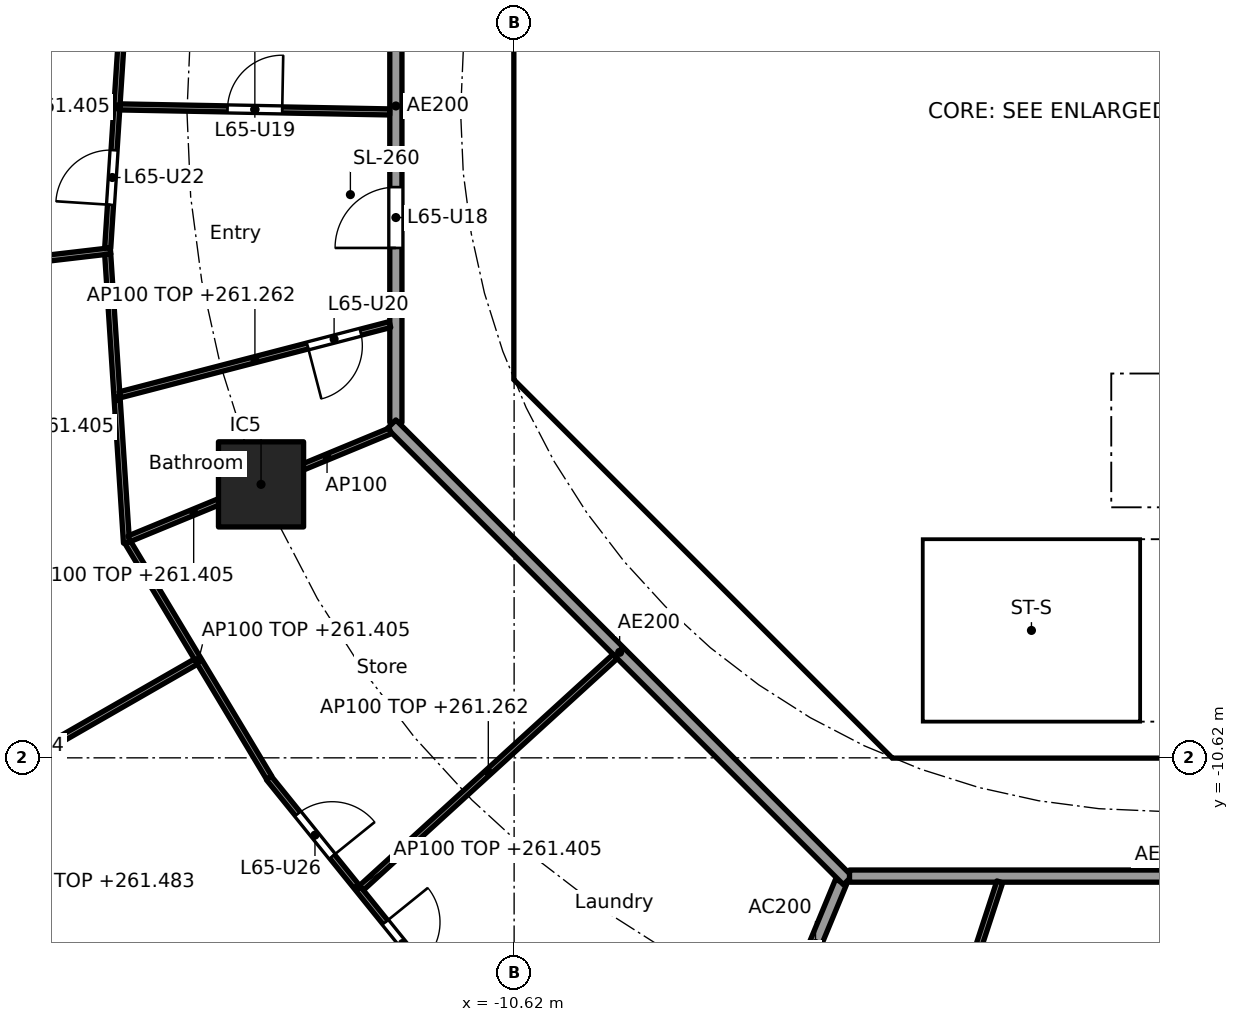
"""IFC4 building model, lengths in metres.
Left out: names, types, materials, properties, quantities, classifications, styles, units other than length and angle.
Written with IfcOpenShell. Run it as: python <this file> out.ifc"""

import sys

from ifc_helpers import new_model, si_unit, direction, frame, frame_2d, origin, origin_2d, place, context, subcontext, project, spatial, polyline, rectangle, outline, extrude, element, fill, save


model = new_model("IFC4")
c1 = context("Model", 3, precision=1e-05, world=origin(), true_north=direction((0.0, 1.0)))
c2 = subcontext(c1, "Body", "Model", "MODEL_VIEW")
j1 = project(units=[si_unit("LENGTHUNIT", "METRE"), si_unit("PLANEANGLEUNIT", "RADIAN")], contexts=[c1])
p1 = place(None, origin())
s1 = spatial("IfcSite", under=j1, at=p1, CompositionType="ELEMENT")
p2 = place(p1, origin())
s2 = spatial("IfcBuilding", under=s1, at=p2, CompositionType="ELEMENT")
p3 = place(p2, frame((0.0, 0.0, 258.5)))
s3 = spatial("IfcBuildingStorey", under=s2, at=p3, CompositionType="ELEMENT", Elevation=258.5)
p4 = place(p3, frame((-14.782, -6.123, 0.0), z_axis=(0.0, 0.0, 1.0), x_axis=(1.0, 0.0, 0.0)))
e1 = element("IfcColumn", 1, at=p4, inside=s3, PredefinedType="COLUMN", context=c2, shape_type="SweptSolid", body=[
    extrude(rectangle(XDim=1.4, YDim=1.4, at=origin_2d()), origin(), (0.0, 0.0, 1.0), 3.7),
])
p5 = place(p3, frame((-10.325, 3.801, 0.0), z_axis=(0.0, 0.0, 1.0), x_axis=(0.0, -1.0, 0.0)))
e2 = element("IfcWall", 2, at=p5, inside=s3, PredefinedType="SHEAR", context=c2, shape_type="SweptSolid", body=[
    extrude(rectangle(XDim=7.602, YDim=0.6, at=frame_2d((3.801, 0.0))), origin(), (0.0, 0.0, 1.0), 3.44),
])
p6 = place(p5, frame((0.651, 0.0, 0.0)))
e3 = element("IfcOpeningElement", 3, at=p6, cuts=e2, PredefinedType="OPENING", context=c2, shape_type="SweptSolid", body=[
    extrude(rectangle(XDim=1.5, YDim=2.1, at=frame_2d((0.75, 1.05))), frame((0.0, 0.31, 0.0), z_axis=(0.0, -1.0, 0.0), x_axis=(1.0, 0.0, 0.0)), (0.0, 0.0, 1.0), 0.62),
])
p7 = place(p5, frame((5.451, 0.0, 0.0)))
e4 = element("IfcOpeningElement", 4, at=p7, cuts=e2, PredefinedType="OPENING", context=c2, shape_type="SweptSolid", body=[
    extrude(rectangle(XDim=1.5, YDim=2.1, at=frame_2d((0.75, 1.05))), frame((0.0, 0.31, 0.0), z_axis=(0.0, -1.0, 0.0), x_axis=(1.0, 0.0, 0.0)), (0.0, 0.0, 1.0), 0.62),
])
p8 = place(p3, frame((-9.988, -4.613, 0.0), z_axis=(0.0, 0.0, 1.0), x_axis=(0.707106781187, -0.707106781187, 0.0)))
e5 = element("IfcWall", 5, at=p8, inside=s3, PredefinedType="SHEAR", context=c2, shape_type="SweptSolid", body=[
    extrude(rectangle(XDim=7.602, YDim=0.6, at=frame_2d((3.801, 0.0))), origin(), (0.0, 0.0, 1.0), 3.44),
])
p9 = place(p8, frame((6.151, 0.0, 0.0)))
e6 = element("IfcOpeningElement", 6, at=p9, cuts=e5, PredefinedType="OPENING", context=c2, shape_type="SweptSolid", body=[
    extrude(rectangle(XDim=1.1, YDim=2.1, at=frame_2d((0.55, 1.05))), frame((0.0, 0.31, 0.0), z_axis=(0.0, -1.0, 0.0), x_axis=(1.0, 0.0, 0.0)), (0.0, 0.0, 1.0), 0.62),
])
p10 = place(p3, frame((-6.6, -7.427, 0.0), z_axis=(0.0, 0.0, 1.0), x_axis=(0.0, 1.0, 0.0)))
e7 = element("IfcWall", 7, at=p10, inside=s3, PredefinedType="PARTITIONING", context=c2, shape_type="SweptSolid", body=[
    extrude(rectangle(XDim=3.127, YDim=0.15, at=frame_2d((1.563, 0.0))), origin(), (0.0, 0.0, 1.0), 3.44),
])
p11 = place(p10, frame((1.076, 0.0, 0.0)))
e8 = element("IfcOpeningElement", 8, at=p11, cuts=e7, PredefinedType="OPENING", context=c2, shape_type="SweptSolid", body=[
    extrude(rectangle(XDim=0.9, YDim=2.1, at=frame_2d((0.45, 1.05))), frame((0.0, 0.085, 0.0), z_axis=(0.0, -1.0, 0.0), x_axis=(1.0, 0.0, 0.0)), (0.0, 0.0, 1.0), 0.17),
])
p12 = place(p3, frame((-4.0, -6.5, 0.0), z_axis=(0.0, 0.0, 1.0), x_axis=(0.0, 1.0, 0.0)))
e9 = element("IfcWall", 9, at=p12, inside=s3, PredefinedType="SOLIDWALL", context=c2, shape_type="SweptSolid", body=[
    extrude(rectangle(XDim=2.2, YDim=0.2, at=frame_2d((1.1, 0.0))), origin(), (0.0, 0.0, 1.0), 3.44),
])
p13 = place(p12, frame((0.65, 0.0, 0.0)))
e10 = element("IfcOpeningElement", 10, at=p13, cuts=e9, PredefinedType="OPENING", context=c2, shape_type="SweptSolid", body=[
    extrude(rectangle(XDim=0.9, YDim=2.1, at=frame_2d((0.45, 1.05))), frame((0.0, 0.11, 0.0), z_axis=(0.0, -1.0, 0.0), x_axis=(1.0, 0.0, 0.0)), (0.0, 0.0, 1.0), 0.22),
])
p14 = place(p3, frame((-6.7, -2.0, 0.0), z_axis=(0.0, 0.0, 1.0), x_axis=(1.0, 0.0, 0.0)))
e11 = element("IfcWall", 11, at=p14, inside=s3, PredefinedType="SOLIDWALL", context=c2, shape_type="SweptSolid", body=[
    extrude(rectangle(XDim=13.4, YDim=0.2, at=frame_2d((6.7, 0.0))), origin(), (0.0, 0.0, 1.0), 3.44),
])
p15 = place(p14, frame((9.45, 0.0, 0.0)))
e12 = element("IfcOpeningElement", 12, at=p15, cuts=e11, PredefinedType="OPENING", context=c2, shape_type="SweptSolid", body=[
    extrude(rectangle(XDim=1.1, YDim=2.1, at=frame_2d((0.55, 1.05))), frame((0.0, 0.11, 0.0), z_axis=(0.0, -1.0, 0.0), x_axis=(1.0, 0.0, 0.0)), (0.0, 0.0, 1.0), 0.22),
])
p16 = place(p14, frame((11.65, 0.0, 0.0)))
e13 = element("IfcOpeningElement", 13, at=p16, cuts=e11, PredefinedType="OPENING", context=c2, shape_type="SweptSolid", body=[
    extrude(rectangle(XDim=1.1, YDim=2.1, at=frame_2d((0.55, 1.05))), frame((0.0, 0.11, 0.0), z_axis=(0.0, -1.0, 0.0), x_axis=(1.0, 0.0, 0.0)), (0.0, 0.0, 1.0), 0.22),
])
p17 = place(p14, frame((1.85, 0.0, 0.0)))
e14 = element("IfcOpeningElement", 14, at=p17, cuts=e11, PredefinedType="OPENING", context=c2, shape_type="SweptSolid", body=[
    extrude(rectangle(XDim=0.9, YDim=2.1, at=frame_2d((0.45, 1.05))), frame((0.0, 0.11, 0.0), z_axis=(0.0, -1.0, 0.0), x_axis=(1.0, 0.0, 0.0)), (0.0, 0.0, 1.0), 0.22),
])
p18 = place(p14, frame((6.25, 0.0, 0.0)))
e15 = element("IfcOpeningElement", 15, at=p18, cuts=e11, PredefinedType="OPENING", context=c2, shape_type="SweptSolid", body=[
    extrude(rectangle(XDim=0.9, YDim=2.1, at=frame_2d((0.45, 1.05))), frame((0.0, 0.11, 0.0), z_axis=(0.0, -1.0, 0.0), x_axis=(1.0, 0.0, 0.0)), (0.0, 0.0, 1.0), 0.22),
])
p19 = place(p3, origin())
e16 = element("IfcWall", 16, at=p19, inside=s3, PredefinedType="SHEAR", context=c2, shape_type="SweptSolid", body=[
    extrude(outline(polyline([(-10.625, -3.801), (-10.025, -3.801), (-10.025, -4.152), (-9.776, -4.401), (-10.2, -4.825), (-10.625, -4.401), (-10.625, -3.801)])), origin(), (0.0, 0.0, 1.0), 3.44),
])
p20 = place(p3, origin())
e17 = element("IfcWall", 17, at=p20, inside=s3, PredefinedType="SHEAR", context=c2, shape_type="SweptSolid", body=[
    extrude(outline(polyline([(-4.152, -10.025), (4.152, -10.025), (4.401, -9.776), (4.825, -10.2), (4.401, -10.625), (-4.401, -10.625), (-4.825, -10.2), (-4.401, -9.776), (-4.152, -10.025)])), origin(), (0.0, 0.0, 1.0), 3.44),
])
p21 = place(p3, frame((-0.9, -6.5, 0.0), z_axis=(0.0, 0.0, 1.0), x_axis=(0.0, 1.0, 0.0)))
e18 = element("IfcWall", 18, at=p21, inside=s3, PredefinedType="SOLIDWALL", context=c2, shape_type="SweptSolid", body=[
    extrude(rectangle(XDim=2.2, YDim=0.2, at=frame_2d((1.1, 0.0))), origin(), (0.0, 0.0, 1.0), 3.44),
])
p22 = place(p3, origin())
e19 = element("IfcWall", 19, at=p22, inside=s3, PredefinedType="SOLIDWALL", context=c2, shape_type="SweptSolid", body=[
    extrude(outline(polyline([(-6.7, -2.1), (-6.5, -2.1), (-6.5, -4.1), (-2.3, -4.1), (-2.3, -2.1), (-2.1, -2.1), (-2.1, -4.1), (2.1, -4.1), (2.1, -2.1), (2.3, -2.1), (2.3, -4.1), (4.3, -4.1), (4.3, -2.1), (4.5, -2.1), (4.5, -4.1), (6.5, -4.1), (6.5, -2.1), (6.7, -2.1), (6.7, -4.3), (-6.7, -4.3), (-6.7, -2.1)])), origin(), (0.0, 0.0, 1.0), 3.44),
])
p23 = place(p3, frame((-10.025, -4.0, 0.0), z_axis=(0.0, 0.0, 1.0), x_axis=(1.0, 0.0, 0.0)))
e20 = element("IfcWall", 20, at=p23, inside=s3, PredefinedType="PARTITIONING", context=c2, shape_type="SweptSolid", body=[
    extrude(rectangle(XDim=3.325, YDim=0.2, at=frame_2d((1.662, 0.0))), origin(), (0.0, 0.0, 1.0), 3.44),
])
p24 = place(p3, origin())
e21 = element("IfcWall", 21, at=p24, inside=s3, PredefinedType="SOLIDWALL", context=c2, shape_type="SweptSolid", body=[
    extrude(outline(polyline([(-3.9, -10.025), (-4.1, -10.025), (-4.1, -7.025), (-3.9, -7.025), (-3.9, -10.025)])), origin(), (0.0, 0.0, 1.0), 3.44),
])
p25 = place(p3, origin())
e22 = element("IfcWall", 22, at=p25, inside=s3, PredefinedType="SOLIDWALL", context=c2, shape_type="SweptSolid", body=[
    extrude(outline(polyline([(4.1, -7.025), (-4.1, -7.025), (-4.1, -6.5), (4.1, -6.5), (4.1, -7.025)])), origin(), (0.0, 0.0, 1.0), 3.44),
])
p26 = place(p3, frame((-5.243, -12.657, 0.0), z_axis=(0.0, 0.0, 1.0), x_axis=(-0.382770106157, -0.923843626288, 0.0)))
e23 = element("IfcWall", 23, at=p26, inside=s3, PredefinedType="PARTITIONING", context=c2, shape_type="SweptSolid", body=[
    extrude(rectangle(XDim=2.199, YDim=0.2, at=frame_2d((1.1, 0.0))), origin(), (0.0, 0.0, 1.0), 3.44),
])
p27 = place(p3, frame((-12.565, 5.304, 0.0), z_axis=(0.0, 0.0, 1.0), x_axis=(0.0, -1.0, 0.0)))
e24 = element("IfcWall", 24, at=p27, inside=s3, PredefinedType="PARTITIONING", context=c2, shape_type="SweptSolid", body=[
    extrude(rectangle(XDim=10.409, YDim=0.2, at=frame_2d((5.205, 0.0))), origin(), (0.0, 0.0, 1.0), 3.44),
])
p28 = place(p27, frame((6.539, 0.0, 0.0)))
e25 = element("IfcOpeningElement", 25, at=p28, cuts=e24, PredefinedType="OPENING", context=c2, shape_type="SweptSolid", body=[
    extrude(rectangle(XDim=1.0, YDim=2.1, at=frame_2d((0.5, 1.05))), frame((0.0, 0.11, 0.0), z_axis=(0.0, -1.0, 0.0), x_axis=(1.0, 0.0, 0.0)), (0.0, 0.0, 1.0), 0.22),
])
p29 = place(p3, frame((-12.635, -5.134, 0.0), z_axis=(0.0, 0.0, 1.0), x_axis=(0.707106781187, -0.707106781187, 0.0)))
e26 = element("IfcWall", 26, at=p29, inside=s3, PredefinedType="PARTITIONING", context=c2, shape_type="SweptSolid", body=[
    extrude(rectangle(XDim=10.609, YDim=0.2, at=frame_2d((5.305, 0.0))), origin(), (0.0, 0.0, 1.0), 3.44),
])
p30 = place(p3, frame((-5.104, -12.565, 0.0), z_axis=(0.0, 0.0, 1.0), x_axis=(1.0, 0.0, 0.0)))
e27 = element("IfcWall", 27, at=p30, inside=s3, PredefinedType="PARTITIONING", context=c2, shape_type="SweptSolid", body=[
    extrude(rectangle(XDim=10.409, YDim=0.2, at=frame_2d((5.205, 0.0))), origin(), (0.0, 0.0, 1.0), 3.44),
])
p31 = place(p3, frame((-17.002, 2.409, 0.0), z_axis=(0.0, 0.0, 1.0), x_axis=(-0.064855550758, -0.997894662545, 0.0)))
e28 = element("IfcWall", 28, at=p31, inside=s3, PredefinedType="PARTITIONING", context=c2, shape_type="SweptSolid", body=[
    extrude(rectangle(XDim=4.656, YDim=0.1, at=frame_2d((2.328, 0.0))), origin(), (0.0, 0.0, 1.0), 2.905),
])
p32 = place(p31, frame((3.042, 0.0, 0.0)))
e29 = element("IfcOpeningElement", 29, at=p32, cuts=e28, PredefinedType="OPENING", context=c2, shape_type="SweptSolid", body=[
    extrude(rectangle(XDim=0.9, YDim=2.1, at=frame_2d((0.45, 1.05))), frame((0.0, 0.06, 0.0), z_axis=(0.0, -1.0, 0.0), x_axis=(1.0, 0.0, 0.0)), (0.0, 0.0, 1.0), 0.12),
])
p33 = place(p3, frame((-12.665, 0.002, 0.0), z_axis=(0.0, 0.0, 1.0), x_axis=(-0.999827178165, 0.018590691287, 0.0)))
e30 = element("IfcWall", 30, at=p33, inside=s3, PredefinedType="PARTITIONING", context=c2, shape_type="SweptSolid", body=[
    extrude(rectangle(XDim=4.439, YDim=0.1, at=frame_2d((2.219, 0.0))), origin(), (0.0, 0.0, 1.0), 2.762),
])
p34 = place(p33, frame((1.769, 0.0, 0.0)))
e31 = element("IfcOpeningElement", 31, at=p34, cuts=e30, PredefinedType="OPENING", context=c2, shape_type="SweptSolid", body=[
    extrude(rectangle(XDim=0.9, YDim=2.1, at=frame_2d((0.45, 1.05))), frame((0.0, 0.06, 0.0), z_axis=(0.0, -1.0, 0.0), x_axis=(1.0, 0.0, 0.0)), (0.0, 0.0, 1.0), 0.12),
])
p35 = place(p3, frame((-17.257, -2.282, 0.0), z_axis=(0.0, 0.0, 1.0), x_axis=(-0.993266024162, -0.11585596767, 0.0)))
e32 = element("IfcWall", 32, at=p35, inside=s3, PredefinedType="PARTITIONING", context=c2, shape_type="SweptSolid", body=[
    extrude(rectangle(XDim=6.168, YDim=0.1, at=frame_2d((3.084, 0.0))), origin(), (0.0, 0.0, 1.0), 2.905),
])
p36 = place(p35, frame((2.659, 0.0, 0.0)))
e33 = element("IfcOpeningElement", 33, at=p36, cuts=e32, PredefinedType="OPENING", context=c2, shape_type="SweptSolid", body=[
    extrude(rectangle(XDim=0.9, YDim=2.1, at=frame_2d((0.45, 1.05))), frame((0.0, 0.06, 0.0), z_axis=(0.0, -1.0, 0.0), x_axis=(1.0, 0.0, 0.0)), (0.0, 0.0, 1.0), 0.12),
])
p37 = place(p3, frame((-17.304, -2.338, 0.0), z_axis=(0.0, 0.0, 1.0), x_axis=(0.065003615989, -0.997885028402, 0.0)))
e34 = element("IfcWall", 34, at=p37, inside=s3, PredefinedType="PARTITIONING", context=c2, shape_type="SweptSolid", body=[
    extrude(rectangle(XDim=4.759, YDim=0.1, at=frame_2d((2.379, 0.0))), origin(), (0.0, 0.0, 1.0), 2.905),
])
p38 = place(p3, frame((-12.662, -3.495, 0.0), z_axis=(0.0, 0.0, 1.0), x_axis=(-0.967834941053, -0.251586022817, 0.0)))
e35 = element("IfcWall", 35, at=p38, inside=s3, PredefinedType="PARTITIONING", context=c2, shape_type="SweptSolid", body=[
    extrude(rectangle(XDim=4.59, YDim=0.1, at=frame_2d((2.295, 0.0))), origin(), (0.0, 0.0, 1.0), 2.762),
])
p39 = place(p38, frame((0.5, 0.0, 0.0)))
e36 = element("IfcOpeningElement", 36, at=p39, cuts=e35, PredefinedType="OPENING", context=c2, shape_type="SweptSolid", body=[
    extrude(rectangle(XDim=0.9, YDim=2.1, at=frame_2d((0.45, 1.05))), frame((0.0, 0.06, 0.0), z_axis=(0.0, -1.0, 0.0), x_axis=(1.0, 0.0, 0.0)), (0.0, 0.0, 1.0), 0.12),
])
p40 = place(p3, frame((-12.657, -5.243, 0.0), z_axis=(0.0, 0.0, 1.0), x_axis=(-0.923864733477, -0.382719158442, 0.0)))
e37 = element("IfcWall", 37, at=p40, inside=s3, PredefinedType="PARTITIONING", context=c2, shape_type="SweptSolid", body=[
    extrude(rectangle(XDim=2.25, YDim=0.1, at=frame_2d((1.125, 0.0))), origin(), (0.0, 0.0, 1.0), 3.44),
])
p41 = place(p3, frame((-14.828, -6.142, 0.0), z_axis=(0.0, 0.0, 1.0), x_axis=(-0.924479819749, -0.381230983627, 0.0)))
e38 = element("IfcWall", 38, at=p41, inside=s3, PredefinedType="PARTITIONING", context=c2, shape_type="SweptSolid", body=[
    extrude(rectangle(XDim=2.296, YDim=0.1, at=frame_2d((1.148, 0.0))), origin(), (0.0, 0.0, 1.0), 2.905),
])
p42 = place(p3, frame((-16.972, -7.08, 0.0), z_axis=(0.0, 0.0, 1.0), x_axis=(0.514989049311, -0.857196756346, 0.0)))
e39 = element("IfcWall", 39, at=p42, inside=s3, PredefinedType="PARTITIONING", context=c2, shape_type="SweptSolid", body=[
    extrude(rectangle(XDim=4.512, YDim=0.1, at=frame_2d((2.256, 0.0))), origin(), (0.0, 0.0, 1.0), 2.905),
])
p43 = place(p3, frame((-15.854, -9.038, 0.0), z_axis=(0.0, 0.0, 1.0), x_axis=(-0.867229230904, -0.497909089157, 0.0)))
e40 = element("IfcWall", 40, at=p43, inside=s3, PredefinedType="PARTITIONING", context=c2, shape_type="SweptSolid", body=[
    extrude(rectangle(XDim=7.853, YDim=0.1, at=frame_2d((3.926, 0.0))), origin(), (0.0, 0.0, 1.0), 2.983),
])
p44 = place(p43, frame((3.476, 0.0, 0.0)))
e41 = element("IfcOpeningElement", 41, at=p44, cuts=e40, PredefinedType="OPENING", context=c2, shape_type="SweptSolid", body=[
    extrude(rectangle(XDim=0.9, YDim=2.1, at=frame_2d((0.45, 1.05))), frame((0.0, 0.06, 0.0), z_axis=(0.0, -1.0, 0.0), x_axis=(1.0, 0.0, 0.0)), (0.0, 0.0, 1.0), 0.12),
])
p45 = place(p3, frame((-14.654, -10.951, 0.0), z_axis=(0.0, 0.0, 1.0), x_axis=(0.62815308134, -0.778089780426, 0.0)))
e42 = element("IfcWall", 42, at=p45, inside=s3, PredefinedType="PARTITIONING", context=c2, shape_type="SweptSolid", body=[
    extrude(rectangle(XDim=4.633, YDim=0.1, at=frame_2d((2.316, 0.0))), origin(), (0.0, 0.0, 1.0), 2.905),
])
p46 = place(p45, frame((0.758, 0.0, 0.0)))
e43 = element("IfcOpeningElement", 43, at=p46, cuts=e42, PredefinedType="OPENING", context=c2, shape_type="SweptSolid", body=[
    extrude(rectangle(XDim=0.9, YDim=2.1, at=frame_2d((0.45, 1.05))), frame((0.0, 0.06, 0.0), z_axis=(0.0, -1.0, 0.0), x_axis=(1.0, 0.0, 0.0)), (0.0, 0.0, 1.0), 0.12),
])
p47 = place(p45, frame((3.049, 0.0, 0.0)))
e44 = element("IfcOpeningElement", 44, at=p47, cuts=e42, PredefinedType="OPENING", context=c2, shape_type="SweptSolid", body=[
    extrude(rectangle(XDim=0.9, YDim=2.1, at=frame_2d((0.45, 1.05))), frame((0.0, 0.06, 0.0), z_axis=(0.0, -1.0, 0.0), x_axis=(1.0, 0.0, 0.0)), (0.0, 0.0, 1.0), 0.12),
])
p48 = place(p3, frame((-8.958, -8.952, 0.0), z_axis=(0.0, 0.0, 1.0), x_axis=(-0.73876526954, -0.673962815385, 0.0)))
e45 = element("IfcWall", 45, at=p48, inside=s3, PredefinedType="PARTITIONING", context=c2, shape_type="SweptSolid", body=[
    extrude(rectangle(XDim=5.647, YDim=0.1, at=frame_2d((2.824, 0.0))), origin(), (0.0, 0.0, 1.0), 2.762),
])
p49 = place(p3, frame((-2.633, -12.66, 0.0), z_axis=(0.0, 0.0, 1.0), x_axis=(-0.311435053715, -0.950267439891, 0.0)))
e46 = element("IfcWall", 46, at=p49, inside=s3, PredefinedType="PARTITIONING", context=c2, shape_type="SweptSolid", body=[
    extrude(rectangle(XDim=6.439, YDim=0.1, at=frame_2d((3.22, 0.0))), origin(), (0.0, 0.0, 1.0), 2.762),
])
p50 = place(p11, origin())
e47 = element("IfcDoor", 47, at=p50, inside=s3, OperationType="SINGLE_SWING_LEFT", PredefinedType="DOOR", context=c2, shape_type="SweptSolid", body=[
    extrude(rectangle(XDim=0.9, YDim=2.1, at=frame_2d((0.45, 1.05))), frame((0.0, 0.025, 0.0), z_axis=(0.0, -1.0, 0.0), x_axis=(1.0, 0.0, 0.0)), (0.0, 0.0, 1.0), 0.05),
])
fill(e8, e47)
p51 = place(p13, frame((0.9, 0.0, 0.0), x_axis=(-1.0, 0.0, 0.0)))
e48 = element("IfcDoor", 48, at=p51, inside=s3, OperationType="SINGLE_SWING_RIGHT", PredefinedType="DOOR", context=c2, shape_type="SweptSolid", body=[
    extrude(rectangle(XDim=0.9, YDim=2.1, at=frame_2d((0.45, 1.05))), frame((0.0, 0.025, 0.0), z_axis=(0.0, -1.0, 0.0), x_axis=(1.0, 0.0, 0.0)), (0.0, 0.0, 1.0), 0.05),
])
fill(e10, e48)
p52 = place(p17, frame((0.9, 0.0, 0.0), x_axis=(-1.0, 0.0, 0.0)))
e49 = element("IfcDoor", 49, at=p52, inside=s3, OperationType="SINGLE_SWING_LEFT", PredefinedType="DOOR", context=c2, shape_type="SweptSolid", body=[
    extrude(rectangle(XDim=0.9, YDim=2.1, at=frame_2d((0.45, 1.05))), frame((0.0, 0.025, 0.0), z_axis=(0.0, -1.0, 0.0), x_axis=(1.0, 0.0, 0.0)), (0.0, 0.0, 1.0), 0.05),
])
fill(e14, e49)
p53 = place(p18, frame((0.9, 0.0, 0.0), x_axis=(-1.0, 0.0, 0.0)))
e50 = element("IfcDoor", 50, at=p53, inside=s3, OperationType="SINGLE_SWING_LEFT", PredefinedType="DOOR", context=c2, shape_type="SweptSolid", body=[
    extrude(rectangle(XDim=0.9, YDim=2.1, at=frame_2d((0.45, 1.05))), frame((0.0, 0.025, 0.0), z_axis=(0.0, -1.0, 0.0), x_axis=(1.0, 0.0, 0.0)), (0.0, 0.0, 1.0), 0.05),
])
fill(e15, e50)
p54 = place(p7, origin())
e51 = element("IfcDoor", 51, at=p54, inside=s3, OperationType="DOUBLE_DOOR_SINGLE_SWING", PredefinedType="DOOR", context=c2, shape_type="SweptSolid", body=[
    extrude(rectangle(XDim=1.5, YDim=2.1, at=frame_2d((0.75, 1.05))), frame((0.0, 0.025, 0.0), z_axis=(0.0, -1.0, 0.0), x_axis=(1.0, 0.0, 0.0)), (0.0, 0.0, 1.0), 0.05),
])
fill(e4, e51)
p55 = place(p9, origin())
e52 = element("IfcDoor", 52, at=p55, inside=s3, OperationType="SINGLE_SWING_LEFT", PredefinedType="DOOR", context=c2, shape_type="SweptSolid", body=[
    extrude(rectangle(XDim=1.1, YDim=2.1, at=frame_2d((0.55, 1.05))), frame((0.0, 0.025, 0.0), z_axis=(0.0, -1.0, 0.0), x_axis=(1.0, 0.0, 0.0)), (0.0, 0.0, 1.0), 0.05),
])
fill(e6, e52)
p56 = place(p28, frame((1.0, 0.0, 0.0), x_axis=(-1.0, 0.0, 0.0)))
e53 = element("IfcDoor", 53, at=p56, inside=s3, OperationType="SINGLE_SWING_LEFT", PredefinedType="DOOR", context=c2, shape_type="SweptSolid", body=[
    extrude(rectangle(XDim=1.0, YDim=2.1, at=frame_2d((0.5, 1.05))), frame((0.0, 0.025, 0.0), z_axis=(0.0, -1.0, 0.0), x_axis=(1.0, 0.0, 0.0)), (0.0, 0.0, 1.0), 0.05),
])
fill(e25, e53)
p57 = place(p34, frame((0.9, 0.0, 0.0), x_axis=(-1.0, 0.0, 0.0)))
e54 = element("IfcDoor", 54, at=p57, inside=s3, OperationType="SINGLE_SWING_RIGHT", PredefinedType="DOOR", context=c2, shape_type="SweptSolid", body=[
    extrude(rectangle(XDim=0.9, YDim=2.1, at=frame_2d((0.45, 1.05))), frame((0.0, 0.025, 0.0), z_axis=(0.0, -1.0, 0.0), x_axis=(1.0, 0.0, 0.0)), (0.0, 0.0, 1.0), 0.05),
])
fill(e31, e54)
p58 = place(p39, origin())
e55 = element("IfcDoor", 55, at=p58, inside=s3, OperationType="SINGLE_SWING_RIGHT", PredefinedType="DOOR", context=c2, shape_type="SweptSolid", body=[
    extrude(rectangle(XDim=0.9, YDim=2.1, at=frame_2d((0.45, 1.05))), frame((0.0, 0.025, 0.0), z_axis=(0.0, -1.0, 0.0), x_axis=(1.0, 0.0, 0.0)), (0.0, 0.0, 1.0), 0.05),
])
fill(e36, e55)
p59 = place(p32, frame((0.9, 0.0, 0.0), x_axis=(-1.0, 0.0, 0.0)))
e56 = element("IfcDoor", 56, at=p59, inside=s3, OperationType="SINGLE_SWING_LEFT", PredefinedType="DOOR", context=c2, shape_type="SweptSolid", body=[
    extrude(rectangle(XDim=0.9, YDim=2.1, at=frame_2d((0.45, 1.05))), frame((0.0, 0.025, 0.0), z_axis=(0.0, -1.0, 0.0), x_axis=(1.0, 0.0, 0.0)), (0.0, 0.0, 1.0), 0.05),
])
fill(e29, e56)
p60 = place(p46, origin())
e57 = element("IfcDoor", 57, at=p60, inside=s3, OperationType="SINGLE_SWING_RIGHT", PredefinedType="DOOR", context=c2, shape_type="SweptSolid", body=[
    extrude(rectangle(XDim=0.9, YDim=2.1, at=frame_2d((0.45, 1.05))), frame((0.0, 0.025, 0.0), z_axis=(0.0, -1.0, 0.0), x_axis=(1.0, 0.0, 0.0)), (0.0, 0.0, 1.0), 0.05),
])
fill(e43, e57)
p61 = place(p47, origin())
e58 = element("IfcDoor", 58, at=p61, inside=s3, OperationType="SINGLE_SWING_LEFT", PredefinedType="DOOR", context=c2, shape_type="SweptSolid", body=[
    extrude(rectangle(XDim=0.9, YDim=2.1, at=frame_2d((0.45, 1.05))), frame((0.0, 0.025, 0.0), z_axis=(0.0, -1.0, 0.0), x_axis=(1.0, 0.0, 0.0)), (0.0, 0.0, 1.0), 0.05),
])
fill(e44, e58)
save(model, sys.argv[1])
